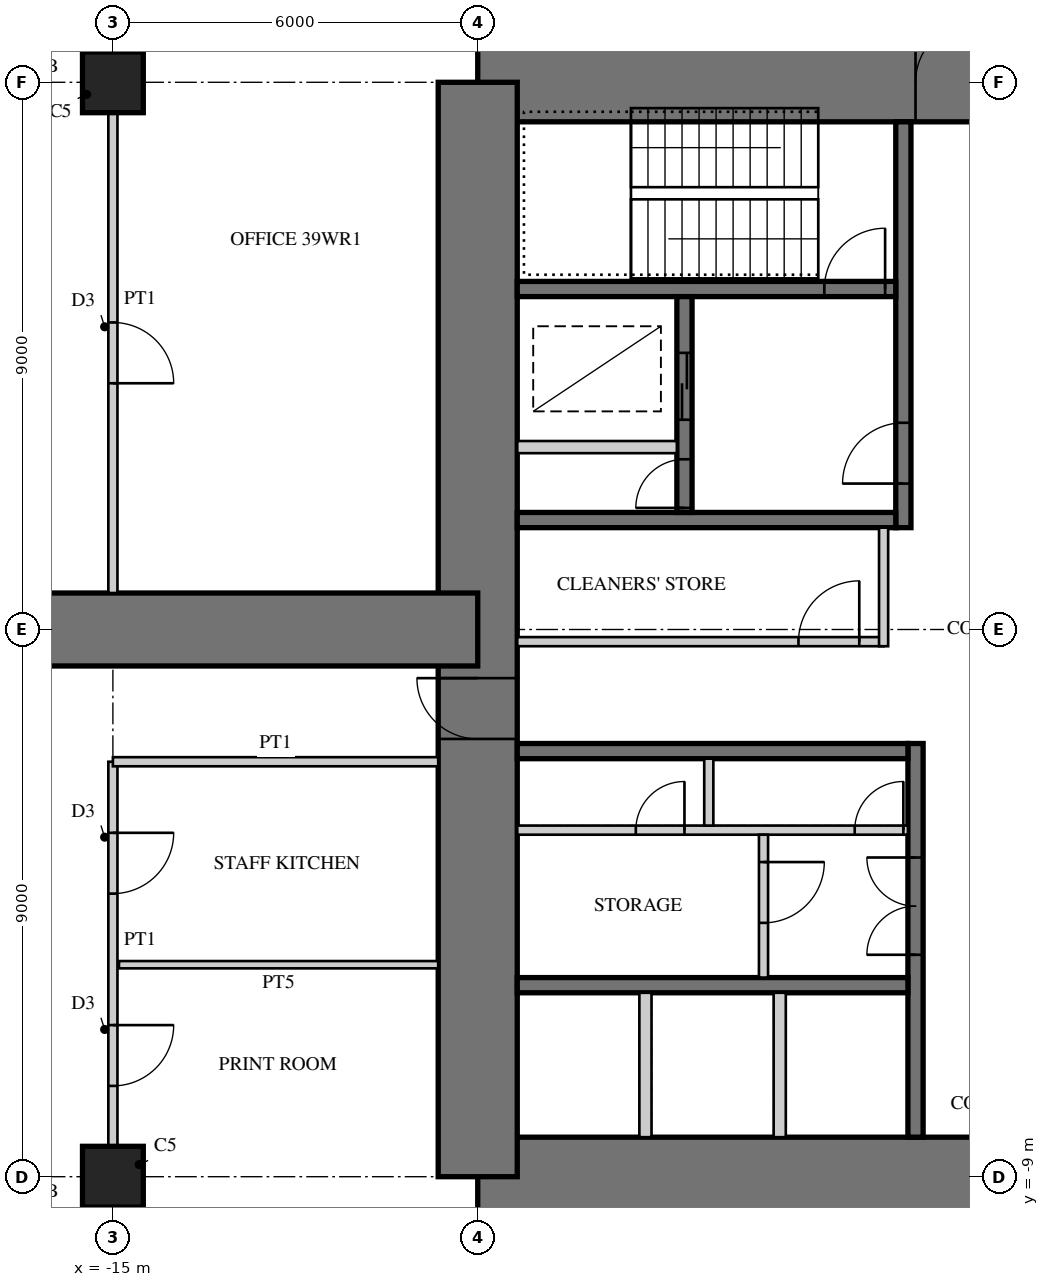
"""IFC4 building model, lengths in metres.
Left out: names, types, materials, properties, quantities, classifications, styles, units other than length and angle.
Written with IfcOpenShell. Run it as: python <this file> out.ifc"""

import sys

from ifc_helpers import new_model, si_unit, direction, frame, frame_2d, origin, origin_2d, place, context, subcontext, project, spatial, rectangle, extrude, element, fill, save


model = new_model("IFC4")
c1 = context("Model", 3, precision=1e-05, world=origin(), true_north=direction((0.0, 1.0)))
c2 = subcontext(c1, "Body", "Model", "MODEL_VIEW")
j1 = project(units=[si_unit("LENGTHUNIT", "METRE"), si_unit("PLANEANGLEUNIT", "RADIAN")], contexts=[c1])
p1 = place(None, origin())
s1 = spatial("IfcSite", under=j1, at=p1, CompositionType="ELEMENT")
p2 = place(p1, origin())
s2 = spatial("IfcBuilding", under=s1, at=p2, CompositionType="ELEMENT")
p3 = place(p2, frame((0.0, 0.0, 160.5)))
s3 = spatial("IfcBuildingStorey", under=s2, at=p3, CompositionType="ELEMENT", Elevation=160.5)
p4 = place(p3, frame((9.0, 9.0, 0.0), z_axis=(0.0, 0.0, 1.0), x_axis=(-1.0, 0.0, 0.0)))
e1 = element("IfcWall", 1, at=p4, inside=s3, PredefinedType="SHEAR", context=c2, shape_type="SweptSolid", body=[
    extrude(rectangle(XDim=18.0, YDim=1.3, at=frame_2d((9.0, 0.0))), origin(), (0.0, 0.0, 1.0), 4.0),
])
p5 = place(p4, frame((9.8, 0.0, 0.0)))
e2 = element("IfcOpeningElement", 2, at=p5, cuts=e1, PredefinedType="OPENING", context=c2, shape_type="SweptSolid", body=[
    extrude(rectangle(XDim=1.0, YDim=2.4, at=frame_2d((0.5, 1.2))), frame((0.0, 0.66, 0.0), z_axis=(0.0, -1.0, 0.0), x_axis=(1.0, 0.0, 0.0)), (0.0, 0.0, 1.0), 1.32),
])
p6 = place(p3, frame((-9.0, -9.0, 0.0), z_axis=(0.0, 0.0, 1.0), x_axis=(1.0, 0.0, 0.0)))
e3 = element("IfcWall", 3, at=p6, inside=s3, PredefinedType="SHEAR", context=c2, shape_type="SweptSolid", body=[
    extrude(rectangle(XDim=18.0, YDim=1.3, at=frame_2d((9.0, 0.0))), origin(), (0.0, 0.0, 1.0), 4.0),
])
p7 = place(p6, frame((9.8, 0.0, 0.0)))
e4 = element("IfcOpeningElement", 4, at=p7, cuts=e3, PredefinedType="OPENING", context=c2, shape_type="SweptSolid", body=[
    extrude(rectangle(XDim=1.0, YDim=2.4, at=frame_2d((0.5, 1.2))), frame((0.0, 0.66, 0.0), z_axis=(0.0, -1.0, 0.0), x_axis=(1.0, 0.0, 0.0)), (0.0, 0.0, 1.0), 1.32),
])
p8 = place(p3, frame((-9.0, 9.0, 0.0), z_axis=(0.0, 0.0, 1.0), x_axis=(0.0, -1.0, 0.0)))
e5 = element("IfcWall", 5, at=p8, inside=s3, PredefinedType="SHEAR", context=c2, shape_type="SweptSolid", body=[
    extrude(rectangle(XDim=18.0, YDim=1.3, at=frame_2d((9.0, 0.0))), origin(), (0.0, 0.0, 1.0), 4.0),
])
p9 = place(p8, frame((9.8, 0.0, 0.0)))
e6 = element("IfcOpeningElement", 6, at=p9, cuts=e5, PredefinedType="OPENING", context=c2, shape_type="SweptSolid", body=[
    extrude(rectangle(XDim=1.0, YDim=2.4, at=frame_2d((0.5, 1.2))), frame((0.0, 0.66, 0.0), z_axis=(0.0, -1.0, 0.0), x_axis=(1.0, 0.0, 0.0)), (0.0, 0.0, 1.0), 1.32),
])
p10 = place(p3, frame((-2.0, 1.675, 0.0), z_axis=(0.0, 0.0, 1.0), x_axis=(0.0, 1.0, 0.0)))
e7 = element("IfcWall", 7, at=p10, inside=s3, PredefinedType="SHEAR", context=c2, shape_type="SweptSolid", body=[
    extrude(rectangle(XDim=6.675, YDim=0.25, at=frame_2d((3.337, 0.0))), origin(), (0.0, 0.0, 1.0), 4.0),
])
p11 = place(p10, frame((0.725, 0.0, 0.0)))
e8 = element("IfcOpeningElement", 8, at=p11, cuts=e7, PredefinedType="OPENING", context=c2, shape_type="SweptSolid", body=[
    extrude(rectangle(XDim=1.0, YDim=2.1, at=frame_2d((0.5, 1.05))), frame((0.0, 0.135, 0.0), z_axis=(0.0, -1.0, 0.0), x_axis=(1.0, 0.0, 0.0)), (0.0, 0.0, 1.0), 0.27),
])
p12 = place(p3, frame((-2.125, 1.8, 0.0), z_axis=(0.0, 0.0, 1.0), x_axis=(-1.0, 0.0, 0.0)))
e9 = element("IfcWall", 9, at=p12, inside=s3, PredefinedType="SHEAR", context=c2, shape_type="SweptSolid", body=[
    extrude(rectangle(XDim=6.225, YDim=0.25, at=frame_2d((3.113, 0.0))), origin(), (0.0, 0.0, 1.0), 4.0),
])
p13 = place(p3, frame((-2.125, 5.6, 0.0), z_axis=(0.0, 0.0, 1.0), x_axis=(-1.0, 0.0, 0.0)))
e10 = element("IfcWall", 10, at=p13, inside=s3, PredefinedType="SHEAR", context=c2, shape_type="SweptSolid", body=[
    extrude(rectangle(XDim=6.225, YDim=0.25, at=frame_2d((3.113, 0.0))), origin(), (0.0, 0.0, 1.0), 4.0),
])
p14 = place(p13, frame((0.175, 0.0, 0.0)))
e11 = element("IfcOpeningElement", 11, at=p14, cuts=e10, PredefinedType="OPENING", context=c2, shape_type="SweptSolid", body=[
    extrude(rectangle(XDim=1.0, YDim=2.1, at=frame_2d((0.5, 1.05))), frame((0.0, 0.135, 0.0), z_axis=(0.0, -1.0, 0.0), x_axis=(1.0, 0.0, 0.0)), (0.0, 0.0, 1.0), 0.27),
])
p15 = place(p3, frame((-5.6, 1.925, 0.0), z_axis=(0.0, 0.0, 1.0), x_axis=(0.0, 1.0, 0.0)))
e12 = element("IfcWall", 12, at=p15, inside=s3, PredefinedType="SHEAR", context=c2, shape_type="SweptSolid", body=[
    extrude(rectangle(XDim=3.55, YDim=0.25, at=frame_2d((1.775, 0.0))), origin(), (0.0, 0.0, 1.0), 4.0),
])
p16 = place(p15, frame((1.525, 0.0, 0.0)))
e13 = element("IfcOpeningElement", 13, at=p16, cuts=e12, PredefinedType="OPENING", context=c2, shape_type="SweptSolid", body=[
    extrude(rectangle(XDim=1.1, YDim=2.2, at=frame_2d((0.55, 1.1))), frame((0.0, 0.135, 0.0), z_axis=(0.0, -1.0, 0.0), x_axis=(1.0, 0.0, 0.0)), (0.0, 0.0, 1.0), 0.27),
])
p17 = place(p15, frame((0.075, 0.0, 0.0)))
e14 = element("IfcOpeningElement", 14, at=p17, cuts=e12, PredefinedType="OPENING", context=c2, shape_type="SweptSolid", body=[
    extrude(rectangle(XDim=0.8, YDim=2.1, at=frame_2d((0.4, 1.05))), frame((0.0, 0.135, 0.0), z_axis=(0.0, -1.0, 0.0), x_axis=(1.0, 0.0, 0.0)), (0.0, 0.0, 1.0), 0.27),
])
p18 = place(p3, frame((-5.725, 3.0, 0.0), z_axis=(0.0, 0.0, 1.0), x_axis=(-1.0, 0.0, 0.0)))
e15 = element("IfcWall", 15, at=p18, inside=s3, PredefinedType="PARTITIONING", context=c2, shape_type="SweptSolid", body=[
    extrude(rectangle(XDim=2.625, YDim=0.2, at=frame_2d((1.312, 0.0))), origin(), (0.0, 0.0, 1.0), 4.0),
])
p19 = place(p3, frame((-1.8, -1.875, 0.0), z_axis=(0.0, 0.0, 1.0), x_axis=(0.0, -1.0, 0.0)))
e16 = element("IfcWall", 16, at=p19, inside=s3, PredefinedType="SHEAR", context=c2, shape_type="SweptSolid", body=[
    extrude(rectangle(XDim=6.475, YDim=0.25, at=frame_2d((3.238, 0.0))), origin(), (0.0, 0.0, 1.0), 4.0),
])
p20 = place(p19, frame((1.875, 0.0, 0.0)))
e17 = element("IfcOpeningElement", 17, at=p20, cuts=e16, PredefinedType="OPENING", context=c2, shape_type="SweptSolid", body=[
    extrude(rectangle(XDim=1.6, YDim=2.4, at=frame_2d((0.8, 1.2))), frame((0.0, 0.135, 0.0), z_axis=(0.0, -1.0, 0.0), x_axis=(1.0, 0.0, 0.0)), (0.0, 0.0, 1.0), 0.27),
])
for number, where, z_axis, x_axis in (
    (18, (-1.925, -2.0, 0.0), (0.0, 0.0, 1.0), (-1.0, 0.0, 0.0)),
    (19, (-1.925, -5.85, 0.0), (0.0, 0.0, 1.0), (-1.0, 0.0, 0.0)),
):
    element("IfcWall", number, at=place(p3, frame(where, z_axis=z_axis, x_axis=x_axis)), inside=s3, PredefinedType="SHEAR", context=c2, shape_type="SweptSolid", body=[
        extrude(rectangle(XDim=6.425, YDim=0.25, at=frame_2d((3.212, 0.0))), origin(), (0.0, 0.0, 1.0), 4.0),
    ])
p21 = place(p3, frame((-1.925, -3.3, 0.0), z_axis=(0.0, 0.0, 1.0), x_axis=(-1.0, 0.0, 0.0)))
e20 = element("IfcWall", 20, at=p21, inside=s3, PredefinedType="PARTITIONING", context=c2, shape_type="SweptSolid", body=[
    extrude(rectangle(XDim=6.425, YDim=0.15, at=frame_2d((3.212, 0.0))), origin(), (0.0, 0.0, 1.0), 4.0),
])
p22 = place(p21, frame((0.075, 0.0, 0.0)))
e21 = element("IfcOpeningElement", 21, at=p22, cuts=e20, PredefinedType="OPENING", context=c2, shape_type="SweptSolid", body=[
    extrude(rectangle(XDim=0.8, YDim=2.1, at=frame_2d((0.4, 1.05))), frame((0.0, 0.085, 0.0), z_axis=(0.0, -1.0, 0.0), x_axis=(1.0, 0.0, 0.0)), (0.0, 0.0, 1.0), 0.17),
])
p23 = place(p21, frame((3.675, 0.0, 0.0)))
e22 = element("IfcOpeningElement", 22, at=p23, cuts=e20, PredefinedType="OPENING", context=c2, shape_type="SweptSolid", body=[
    extrude(rectangle(XDim=0.8, YDim=2.1, at=frame_2d((0.4, 1.05))), frame((0.0, 0.085, 0.0), z_axis=(0.0, -1.0, 0.0), x_axis=(1.0, 0.0, 0.0)), (0.0, 0.0, 1.0), 0.17),
])
p24 = place(p3, frame((-5.2, -2.125, 0.0), z_axis=(0.0, 0.0, 1.0), x_axis=(0.0, -1.0, 0.0)))
e23 = element("IfcWall", 23, at=p24, inside=s3, PredefinedType="PARTITIONING", context=c2, shape_type="SweptSolid", body=[
    extrude(rectangle(XDim=1.1, YDim=0.15, at=frame_2d((0.55, 0.0))), origin(), (0.0, 0.0, 1.0), 4.0),
])
for number, where, z_axis, x_axis in (
    (24, (-4.033, -5.975, 0.0), (0.0, 0.0, 1.0), (0.0, -1.0, 0.0)),
    (25, (-6.242, -5.975, 0.0), (0.0, 0.0, 1.0), (0.0, -1.0, 0.0)),
):
    element("IfcWall", number, at=place(p3, frame(where, z_axis=z_axis, x_axis=x_axis)), inside=s3, PredefinedType="PARTITIONING", context=c2, shape_type="SweptSolid", body=[
        extrude(rectangle(XDim=2.375, YDim=0.2, at=frame_2d((1.188, 0.0))), origin(), (0.0, 0.0, 1.0), 4.0),
    ])
p25 = place(p3, frame((-9.0, 0.0, 0.0), z_axis=(0.0, 0.0, 1.0), x_axis=(-1.0, 0.0, 0.0)))
e26 = element("IfcWall", 26, at=p25, inside=s3, PredefinedType="SHEAR", context=c2, shape_type="SweptSolid", body=[
    extrude(rectangle(XDim=18.0, YDim=1.2, at=frame_2d((9.0, 0.0))), origin(), (0.0, 0.0, 1.0), 4.0),
])
p26 = place(p25, frame((9.8, 0.0, 0.0)))
e27 = element("IfcOpeningElement", 27, at=p26, cuts=e26, PredefinedType="OPENING", context=c2, shape_type="SweptSolid", body=[
    extrude(rectangle(XDim=1.0, YDim=2.2, at=frame_2d((0.5, 1.1))), frame((0.0, 0.61, 0.0), z_axis=(0.0, -1.0, 0.0), x_axis=(1.0, 0.0, 0.0)), (0.0, 0.0, 1.0), 1.22),
])
for number, where, z_axis, x_axis in (
    (28, (-15.0, 9.0, 0.0), (0.0, 0.0, 1.0), (1.0, 0.0, 0.0)),
    (29, (-15.0, -9.0, 0.0), (0.0, 0.0, 1.0), (1.0, 0.0, 0.0)),
):
    element("IfcColumn", number, at=place(p3, frame(where, z_axis=z_axis, x_axis=x_axis)), inside=s3, PredefinedType="COLUMN", context=c2, shape_type="SweptSolid", body=[
        extrude(rectangle(XDim=1.0, YDim=1.0, at=origin_2d()), origin(), (0.0, 0.0, 1.0), 4.0),
    ])
p27 = place(p3, frame((-2.325, -0.2, 0.0), z_axis=(0.0, 0.0, 1.0), x_axis=(-1.0, 0.0, 0.0)))
e30 = element("IfcWall", 30, at=p27, inside=s3, PredefinedType="PARTITIONING", context=c2, shape_type="SweptSolid", body=[
    extrude(rectangle(XDim=6.025, YDim=0.15, at=frame_2d((3.013, 0.0))), origin(), (0.0, 0.0, 1.0), 3.75),
])
p28 = place(p27, frame((0.4, 0.0, 0.0)))
e31 = element("IfcOpeningElement", 31, at=p28, cuts=e30, PredefinedType="OPENING", context=c2, shape_type="SweptSolid", body=[
    extrude(rectangle(XDim=1.0, YDim=2.1, at=frame_2d((0.5, 1.05))), frame((0.0, 0.085, 0.0), z_axis=(0.0, -1.0, 0.0), x_axis=(1.0, 0.0, 0.0)), (0.0, 0.0, 1.0), 0.17),
])
p29 = place(p3, frame((-2.325, 1.675, 0.0), z_axis=(0.0, 0.0, 1.0), x_axis=(0.0, -1.0, 0.0)))
e32 = element("IfcWall", 32, at=p29, inside=s3, PredefinedType="PARTITIONING", context=c2, shape_type="SweptSolid", body=[
    extrude(rectangle(XDim=1.95, YDim=0.15, at=frame_2d((0.975, 0.0))), origin(), (0.0, 0.0, 1.0), 3.75),
])
p30 = place(p3, frame((-4.3, -3.375, 0.0), z_axis=(0.0, 0.0, 1.0), x_axis=(0.0, -1.0, 0.0)))
e33 = element("IfcWall", 33, at=p30, inside=s3, PredefinedType="PARTITIONING", context=c2, shape_type="SweptSolid", body=[
    extrude(rectangle(XDim=2.35, YDim=0.15, at=frame_2d((1.175, 0.0))), origin(), (0.0, 0.0, 1.0), 3.75),
])
p31 = place(p30, frame((0.45, 0.0, 0.0)))
e34 = element("IfcOpeningElement", 34, at=p31, cuts=e33, PredefinedType="OPENING", context=c2, shape_type="SweptSolid", body=[
    extrude(rectangle(XDim=1.0, YDim=2.1, at=frame_2d((0.5, 1.05))), frame((0.0, 0.085, 0.0), z_axis=(0.0, -1.0, 0.0), x_axis=(1.0, 0.0, 0.0)), (0.0, 0.0, 1.0), 0.17),
])
p32 = place(p3, frame((-15.0, -2.175, 0.0), z_axis=(0.0, 0.0, 1.0), x_axis=(0.0, -1.0, 0.0)))
e35 = element("IfcWall", 35, at=p32, inside=s3, PredefinedType="PARTITIONING", context=c2, shape_type="SweptSolid", body=[
    extrude(rectangle(XDim=6.325, YDim=0.15, at=frame_2d((3.163, 0.0))), origin(), (0.0, 0.0, 1.0), 2.7),
])
p33 = place(p32, frame((1.169, 0.0, 0.0)))
e36 = element("IfcOpeningElement", 36, at=p33, cuts=e35, PredefinedType="OPENING", context=c2, shape_type="SweptSolid", body=[
    extrude(rectangle(XDim=1.0, YDim=2.1, at=frame_2d((0.5, 1.05))), frame((0.0, 0.085, 0.0), z_axis=(0.0, -1.0, 0.0), x_axis=(1.0, 0.0, 0.0)), (0.0, 0.0, 1.0), 0.17),
])
p34 = place(p32, frame((4.332, 0.0, 0.0)))
e37 = element("IfcOpeningElement", 37, at=p34, cuts=e35, PredefinedType="OPENING", context=c2, shape_type="SweptSolid", body=[
    extrude(rectangle(XDim=1.0, YDim=2.1, at=frame_2d((0.5, 1.05))), frame((0.0, 0.085, 0.0), z_axis=(0.0, -1.0, 0.0), x_axis=(1.0, 0.0, 0.0)), (0.0, 0.0, 1.0), 0.17),
])
p35 = place(p3, frame((-9.65, -2.175, 0.0), z_axis=(0.0, 0.0, 1.0), x_axis=(-1.0, 0.0, 0.0)))
e38 = element("IfcWall", 38, at=p35, inside=s3, PredefinedType="PARTITIONING", context=c2, shape_type="SweptSolid", body=[
    extrude(rectangle(XDim=5.35, YDim=0.15, at=frame_2d((2.675, 0.0))), origin(), (0.0, 0.0, 1.0), 3.75),
])
p36 = place(p3, frame((-9.65, -5.513, 0.0), z_axis=(0.0, 0.0, 1.0), x_axis=(-1.0, 0.0, 0.0)))
e39 = element("IfcWall", 39, at=p36, inside=s3, PredefinedType="PLUMBINGWALL", context=c2, shape_type="SweptSolid", body=[
    extrude(rectangle(XDim=5.25, YDim=0.12, at=frame_2d((2.625, 0.0))), origin(), (0.0, 0.0, 1.0), 3.75),
])
p37 = place(p3, frame((-15.0, 8.5, 0.0), z_axis=(0.0, 0.0, 1.0), x_axis=(0.0, -1.0, 0.0)))
e40 = element("IfcWall", 40, at=p37, inside=s3, PredefinedType="PARTITIONING", context=c2, shape_type="SweptSolid", body=[
    extrude(rectangle(XDim=7.9, YDim=0.15, at=frame_2d((3.95, 0.0))), origin(), (0.0, 0.0, 1.0), 2.7),
])
p38 = place(p37, frame((3.45, 0.0, 0.0)))
e41 = element("IfcOpeningElement", 41, at=p38, cuts=e40, PredefinedType="OPENING", context=c2, shape_type="SweptSolid", body=[
    extrude(rectangle(XDim=1.0, YDim=2.1, at=frame_2d((0.5, 1.05))), frame((0.0, 0.085, 0.0), z_axis=(0.0, -1.0, 0.0), x_axis=(1.0, 0.0, 0.0)), (0.0, 0.0, 1.0), 0.17),
])
p39 = place(p28, frame((1.0, 0.0, 0.0), z_axis=(0.0, 0.0, 1.0), x_axis=(-1.0, 0.0, 0.0)))
e42 = element("IfcDoor", 42, at=p39, inside=s3, OperationType="SINGLE_SWING_RIGHT", PredefinedType="DOOR", context=c2, shape_type="SweptSolid", body=[
    extrude(rectangle(XDim=1.0, YDim=2.1, at=frame_2d((0.5, 1.05))), frame((0.0, 0.025, 0.0), z_axis=(0.0, -1.0, 0.0), x_axis=(1.0, 0.0, 0.0)), (0.0, 0.0, 1.0), 0.05),
])
fill(e31, e42)
p40 = place(p31, origin())
e43 = element("IfcDoor", 43, at=p40, inside=s3, OperationType="SINGLE_SWING_LEFT", PredefinedType="DOOR", context=c2, shape_type="SweptSolid", body=[
    extrude(rectangle(XDim=1.0, YDim=2.1, at=frame_2d((0.5, 1.05))), frame((0.0, 0.025, 0.0), z_axis=(0.0, -1.0, 0.0), x_axis=(1.0, 0.0, 0.0)), (0.0, 0.0, 1.0), 0.05),
])
fill(e34, e43)
p41 = place(p33, origin())
e44 = element("IfcDoor", 44, at=p41, inside=s3, OperationType="SINGLE_SWING_LEFT", PredefinedType="DOOR", context=c2, shape_type="SweptSolid", body=[
    extrude(rectangle(XDim=1.0, YDim=2.1, at=frame_2d((0.5, 1.05))), frame((0.0, 0.025, 0.0), z_axis=(0.0, -1.0, 0.0), x_axis=(1.0, 0.0, 0.0)), (0.0, 0.0, 1.0), 0.05),
])
fill(e36, e44)
p42 = place(p34, origin())
e45 = element("IfcDoor", 45, at=p42, inside=s3, OperationType="SINGLE_SWING_LEFT", PredefinedType="DOOR", context=c2, shape_type="SweptSolid", body=[
    extrude(rectangle(XDim=1.0, YDim=2.1, at=frame_2d((0.5, 1.05))), frame((0.0, 0.025, 0.0), z_axis=(0.0, -1.0, 0.0), x_axis=(1.0, 0.0, 0.0)), (0.0, 0.0, 1.0), 0.05),
])
fill(e37, e45)
p43 = place(p38, origin())
e46 = element("IfcDoor", 46, at=p43, inside=s3, OperationType="SINGLE_SWING_RIGHT", PredefinedType="DOOR", context=c2, shape_type="SweptSolid", body=[
    extrude(rectangle(XDim=1.0, YDim=2.1, at=frame_2d((0.5, 1.05))), frame((0.0, 0.025, 0.0), z_axis=(0.0, -1.0, 0.0), x_axis=(1.0, 0.0, 0.0)), (0.0, 0.0, 1.0), 0.05),
])
fill(e41, e46)
p44 = place(p5, frame((1.0, 0.0, 0.0), z_axis=(0.0, 0.0, 1.0), x_axis=(-1.0, 0.0, 0.0)))
e47 = element("IfcDoor", 47, at=p44, inside=s3, OperationType="SINGLE_SWING_RIGHT", PredefinedType="DOOR", context=c2, shape_type="SweptSolid", body=[
    extrude(rectangle(XDim=1.0, YDim=2.4, at=frame_2d((0.5, 1.2))), frame((0.0, -0.005, 0.0), z_axis=(0.0, -1.0, 0.0), x_axis=(1.0, 0.0, 0.0)), (0.0, 0.0, 1.0), 0.05),
])
fill(e2, e47)
p45 = place(p9, frame((1.0, 0.0, 0.0), z_axis=(0.0, 0.0, 1.0), x_axis=(-1.0, 0.0, 0.0)))
e48 = element("IfcDoor", 48, at=p45, inside=s3, OperationType="SINGLE_SWING_RIGHT", PredefinedType="DOOR", context=c2, shape_type="SweptSolid", body=[
    extrude(rectangle(XDim=1.0, YDim=2.4, at=frame_2d((0.5, 1.2))), frame((0.0, -0.005, 0.0), z_axis=(0.0, -1.0, 0.0), x_axis=(1.0, 0.0, 0.0)), (0.0, 0.0, 1.0), 0.05),
])
fill(e6, e48)
p46 = place(p11, origin())
e49 = element("IfcDoor", 49, at=p46, inside=s3, OperationType="SINGLE_SWING_LEFT", PredefinedType="DOOR", context=c2, shape_type="SweptSolid", body=[
    extrude(rectangle(XDim=1.0, YDim=2.1, at=frame_2d((0.5, 1.05))), frame((0.0, 0.025, 0.0), z_axis=(0.0, -1.0, 0.0), x_axis=(1.0, 0.0, 0.0)), (0.0, 0.0, 1.0), 0.05),
])
fill(e8, e49)
p47 = place(p14, frame((1.0, 0.0, 0.0), z_axis=(0.0, 0.0, 1.0), x_axis=(-1.0, 0.0, 0.0)))
e50 = element("IfcDoor", 50, at=p47, inside=s3, OperationType="SINGLE_SWING_RIGHT", PredefinedType="DOOR", context=c2, shape_type="SweptSolid", body=[
    extrude(rectangle(XDim=1.0, YDim=2.1, at=frame_2d((0.5, 1.05))), frame((0.0, 0.025, 0.0), z_axis=(0.0, -1.0, 0.0), x_axis=(1.0, 0.0, 0.0)), (0.0, 0.0, 1.0), 0.05),
])
fill(e11, e50)
p48 = place(p16, origin())
e51 = element("IfcDoor", 51, at=p48, inside=s3, OperationType="DOUBLE_DOOR_SLIDING", PredefinedType="DOOR", context=c2, shape_type="SweptSolid", body=[
    extrude(rectangle(XDim=1.1, YDim=2.2, at=frame_2d((0.55, 1.1))), frame((0.0, 0.025, 0.0), z_axis=(0.0, -1.0, 0.0), x_axis=(1.0, 0.0, 0.0)), (0.0, 0.0, 1.0), 0.05),
])
fill(e13, e51)
p49 = place(p17, origin())
e52 = element("IfcDoor", 52, at=p49, inside=s3, OperationType="SINGLE_SWING_LEFT", PredefinedType="DOOR", context=c2, shape_type="SweptSolid", body=[
    extrude(rectangle(XDim=0.8, YDim=2.1, at=frame_2d((0.4, 1.05))), frame((0.0, 0.025, 0.0), z_axis=(0.0, -1.0, 0.0), x_axis=(1.0, 0.0, 0.0)), (0.0, 0.0, 1.0), 0.05),
])
fill(e14, e52)
p50 = place(p20, frame((1.6, 0.0, 0.0), z_axis=(0.0, 0.0, 1.0), x_axis=(-1.0, 0.0, 0.0)))
e53 = element("IfcDoor", 53, at=p50, inside=s3, OperationType="DOUBLE_DOOR_SINGLE_SWING", PredefinedType="DOOR", context=c2, shape_type="SweptSolid", body=[
    extrude(rectangle(XDim=1.6, YDim=2.4, at=frame_2d((0.8, 1.2))), frame((0.0, 0.025, 0.0), z_axis=(0.0, -1.0, 0.0), x_axis=(1.0, 0.0, 0.0)), (0.0, 0.0, 1.0), 0.05),
])
fill(e17, e53)
p51 = place(p22, frame((0.8, 0.0, 0.0), z_axis=(0.0, 0.0, 1.0), x_axis=(-1.0, 0.0, 0.0)))
e54 = element("IfcDoor", 54, at=p51, inside=s3, OperationType="SINGLE_SWING_RIGHT", PredefinedType="DOOR", context=c2, shape_type="SweptSolid", body=[
    extrude(rectangle(XDim=0.8, YDim=2.1, at=frame_2d((0.4, 1.05))), frame((0.0, 0.025, 0.0), z_axis=(0.0, -1.0, 0.0), x_axis=(1.0, 0.0, 0.0)), (0.0, 0.0, 1.0), 0.05),
])
fill(e21, e54)
p52 = place(p23, frame((0.8, 0.0, 0.0), z_axis=(0.0, 0.0, 1.0), x_axis=(-1.0, 0.0, 0.0)))
e55 = element("IfcDoor", 55, at=p52, inside=s3, OperationType="SINGLE_SWING_RIGHT", PredefinedType="DOOR", context=c2, shape_type="SweptSolid", body=[
    extrude(rectangle(XDim=0.8, YDim=2.1, at=frame_2d((0.4, 1.05))), frame((0.0, 0.025, 0.0), z_axis=(0.0, -1.0, 0.0), x_axis=(1.0, 0.0, 0.0)), (0.0, 0.0, 1.0), 0.05),
])
fill(e22, e55)
save(model, sys.argv[1])
